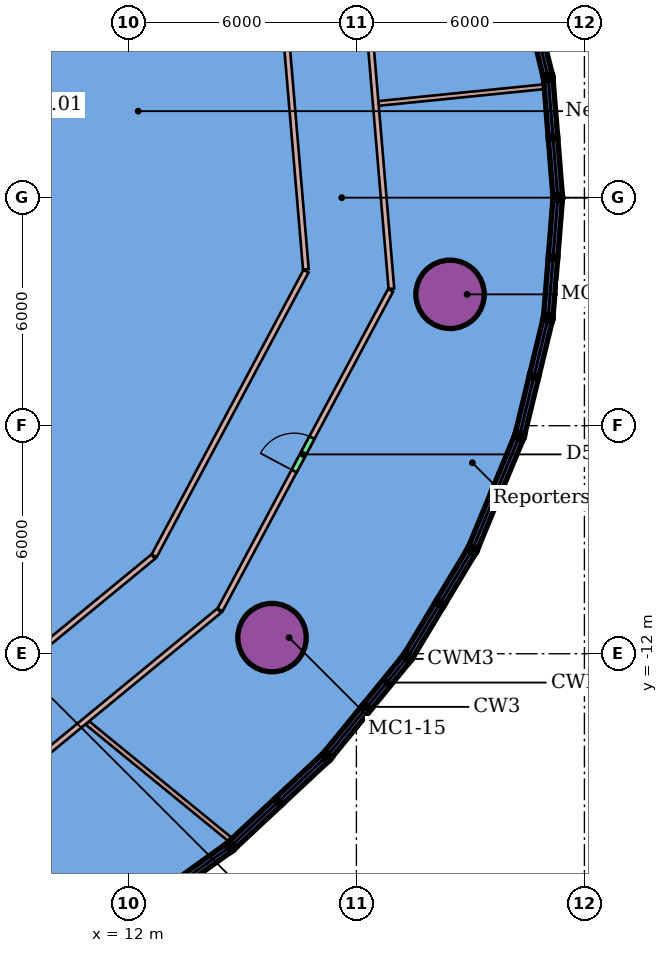
"""IFC4 building model, lengths in metres.
Left out: names, types, materials, properties, quantities, classifications, styles, units other than length and angle.
Written with IfcOpenShell. Run it as: python <this file> out.ifc"""

import sys

from ifc_helpers import new_model, si_unit, direction, frame, frame_2d, origin, origin_2d, place, context, subcontext, project, spatial, rectangle, hollow_circle, extrude, element, fill, save


model = new_model("IFC4")
c1 = context("Model", 3, precision=1e-05, world=origin(), true_north=direction((0.0, 1.0)))
c2 = subcontext(c1, "Body", "Model", "MODEL_VIEW")
j1 = project(units=[si_unit("LENGTHUNIT", "METRE"), si_unit("PLANEANGLEUNIT", "RADIAN")], contexts=[c1])
p1 = place(None, origin())
s1 = spatial("IfcSite", under=j1, at=p1, CompositionType="ELEMENT")
p2 = place(p1, origin())
s2 = spatial("IfcBuilding", under=s1, at=p2, CompositionType="ELEMENT")
p3 = place(p2, frame((0.0, 0.0, 31.5)))
s3 = spatial("IfcBuildingStorey", under=s2, at=p3, CompositionType="ELEMENT", Elevation=31.5)
for number, where, z_axis, x_axis in (
    (1, (15.78, -11.576, 0.0), (0.0, 0.0, 1.0), (1.0, 0.0, 0.0)),
    (2, (20.464, -2.543, 0.0), (0.0, 0.0, 1.0), (1.0, 0.0, 0.0)),
):
    element("IfcColumn", number, at=place(p3, frame(where, z_axis=z_axis, x_axis=x_axis)), inside=s3, PredefinedType="COLUMN", context=c2, shape_type="SweptSolid", body=[
        extrude(hollow_circle(Radius=0.9, WallThickness=0.06, at=origin_2d()), origin(), (0.0, 0.0, 1.0), 4.35),
    ])
p4 = place(p3, frame((15.963, 6.451, 0.0), z_axis=(0.0, 0.0, 1.0), x_axis=(0.084487276917, -0.996424558127, 0.0)))
e3 = element("IfcWall", 3, at=p4, inside=s3, PredefinedType="PARTITIONING", context=c2, shape_type="SweptSolid", body=[
    extrude(rectangle(XDim=8.366, YDim=0.15, at=frame_2d((4.183, 0.0))), origin(), (0.0, 0.0, 1.0), 3.9),
])
p5 = place(p3, frame((12.676, -9.427, 0.0), z_axis=(0.0, 0.0, 1.0), x_axis=(0.470743396375, 0.882270171076, 0.0)))
e4 = element("IfcWall", 4, at=p5, inside=s3, PredefinedType="PARTITIONING", context=c2, shape_type="SweptSolid", body=[
    extrude(rectangle(XDim=8.493, YDim=0.15, at=frame_2d((4.247, 0.0))), origin(), (0.0, 0.0, 1.0), 3.9),
])
p6 = place(p3, frame((8.271, -13.047, 0.0), z_axis=(0.0, 0.0, 1.0), x_axis=(0.772561089928, 0.634940439986, 0.0)))
e5 = element("IfcWall", 5, at=p6, inside=s3, PredefinedType="PARTITIONING", context=c2, shape_type="SweptSolid", body=[
    extrude(rectangle(XDim=5.672, YDim=0.15, at=frame_2d((2.836, 0.0))), origin(), (0.0, 0.0, 1.0), 3.9),
])
p7 = place(p3, frame((18.584, 2.48, 0.0), z_axis=(0.0, 0.0, 1.0), x_axis=(0.994950329661, 0.100368528474, 0.0)))
e6 = element("IfcWall", 6, at=p7, inside=s3, PredefinedType="PARTITIONING", context=c2, shape_type="SweptSolid", body=[
    extrude(rectangle(XDim=4.388, YDim=0.125, at=frame_2d((2.194, 0.0))), origin(), (0.0, 0.0, 1.0), 3.9),
])
p8 = place(p3, frame((18.093, 7.371, 0.0), z_axis=(0.0, 0.0, 1.0), x_axis=(0.084469905026, -0.996426030945, 0.0)))
e7 = element("IfcWall", 7, at=p8, inside=s3, PredefinedType="PARTITIONING", context=c2, shape_type="SweptSolid", body=[
    extrude(rectangle(XDim=9.801, YDim=0.15, at=frame_2d((4.9, 0.0))), origin(), (0.0, 0.0, 1.0), 3.9),
])
p9 = place(p3, frame((10.927, -13.825, 0.0), z_axis=(0.0, 0.0, 1.0), x_axis=(0.774480098596, -0.632598274483, 0.0)))
e8 = element("IfcWall", 8, at=p9, inside=s3, PredefinedType="PARTITIONING", context=c2, shape_type="SweptSolid", body=[
    extrude(rectangle(XDim=4.866, YDim=0.125, at=frame_2d((2.433, 0.0))), origin(), (0.0, 0.0, 1.0), 3.9),
])
p10 = place(p3, frame((7.577, -16.465, 0.0), z_axis=(0.0, 0.0, 1.0), x_axis=(0.772575830308, 0.634922504266, 0.0)))
e9 = element("IfcWall", 9, at=p10, inside=s3, PredefinedType="PARTITIONING", context=c2, shape_type="SweptSolid", body=[
    extrude(rectangle(XDim=8.815, YDim=0.15, at=frame_2d((4.407, 0.0))), origin(), (0.0, 0.0, 1.0), 3.9),
])
p11 = place(p3, frame((14.411, -10.848, 0.0), z_axis=(0.0, 0.0, 1.0), x_axis=(0.470742429837, 0.88227068678, 0.0)))
e10 = element("IfcWall", 10, at=p11, inside=s3, PredefinedType="PARTITIONING", context=c2, shape_type="SweptSolid", body=[
    extrude(rectangle(XDim=9.532, YDim=0.15, at=frame_2d((4.766, 0.0))), origin(), (0.0, 0.0, 1.0), 3.9),
])
p12 = place(p11, frame((4.14, 0.0, 0.0)))
e11 = element("IfcOpeningElement", 11, at=p12, cuts=e10, PredefinedType="OPENING", context=c2, shape_type="SweptSolid", body=[
    extrude(rectangle(XDim=1.0, YDim=2.1, at=frame_2d((0.5, 1.05))), frame((0.0, 0.085, 0.0), z_axis=(0.0, -1.0, 0.0), x_axis=(1.0, 0.0, 0.0)), (0.0, 0.0, 1.0), 0.17),
])
p13 = place(p12, origin())
e12 = element("IfcDoor", 12, at=p13, inside=s3, OperationType="SINGLE_SWING_LEFT", PredefinedType="DOOR", context=c2, shape_type="SweptSolid", body=[
    extrude(rectangle(XDim=1.0, YDim=2.1, at=frame_2d((0.5, 1.05))), frame((0.0, 0.025, 0.0), z_axis=(0.0, -1.0, 0.0), x_axis=(1.0, 0.0, 0.0)), (0.0, 0.0, 1.0), 0.05),
])
fill(e11, e12)
save(model, sys.argv[1])
